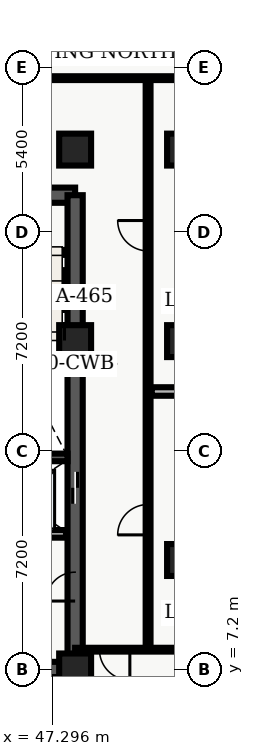
"""IFC4 building model, lengths in metres.
Left out: names, types, materials, properties, quantities, classifications, styles, units other than length and angle.
Written with IfcOpenShell. Run it as: python <this file> out.ifc"""

import sys

from ifc_helpers import new_model, entity, si_unit, converted_unit, direction, frame, origin_with_axes, origin_2d_with_axis, place, context, subcontext, project, spatial, polyline, rectangle, outline, extrude, element, fill, save


model = new_model("IFC4")
c1 = context("Model", 3, precision=1e-05, world=origin_with_axes(), true_north=direction((0.0, 1.0)))
c2 = subcontext(c1, "Body", "Model", "MODEL_VIEW")
j1 = project(units=[si_unit("LENGTHUNIT", "METRE"), converted_unit("PLANEANGLEUNIT", "DEGREE", entity("IfcPlaneAngleMeasure", 0.017), si_unit("PLANEANGLEUNIT", "RADIAN"), dimensions=[0, 0, 0, 0, 0, 0, 0])], contexts=[c1])
p1 = place(None, origin_with_axes())
s1 = spatial("IfcSite", under=j1, at=p1, CompositionType="ELEMENT")
p2 = place(p1, origin_with_axes())
s2 = spatial("IfcBuilding", under=s1, at=p2, CompositionType="ELEMENT")
p3 = place(p2, frame((0.0, 0.0, 164.1), z_axis=(0.0, 0.0, 1.0), x_axis=(1.0, 0.0, 0.0)))
s3 = spatial("IfcBuildingStorey", under=s2, at=p3, CompositionType="ELEMENT", Elevation=164.1)
p4 = place(p3, frame((40.2, 7.2, 0.0), z_axis=(0.0, 0.0, 1.0), x_axis=(1.0, 0.0, 0.0)))
e1 = element("IfcWall", 1, at=p4, inside=s3, PredefinedType="SHEAR", context=c2, shape_type="SweptSolid", body=[
    extrude(outline(polyline([(0.0, -0.25), (7.85, -0.25), (7.85, 0.25), (0.0, 0.25), (0.0, -0.25)])), origin_with_axes(), (0.0, 0.0, 1.0), 3.66),
])
p5 = place(p4, frame((2.175, 0.0, 0.0), z_axis=(0.0, 0.0, 1.0), x_axis=(1.0, 0.0, 0.0)))
e2 = element("IfcOpeningElement", 2, at=p5, cuts=e1, PredefinedType="OPENING", context=c2, shape_type="SweptSolid", body=[
    extrude(rectangle(XDim=1.05, YDim=0.52, at=origin_2d_with_axis()), origin_with_axes(), (0.0, 0.0, 1.0), 2.15),
])
p6 = place(p3, frame((40.2, 22.8, 0.0), z_axis=(0.0, 0.0, 1.0), x_axis=(1.0, 0.0, 0.0)))
e3 = element("IfcWall", 3, at=p6, inside=s3, PredefinedType="SHEAR", context=c2, shape_type="SweptSolid", body=[
    extrude(outline(polyline([(0.0, -0.25), (7.85, -0.25), (7.85, 0.25), (0.0, 0.25), (0.0, -0.25)])), origin_with_axes(), (0.0, 0.0, 1.0), 3.66),
])
p7 = place(p6, frame((5.775, 0.0, 0.0), z_axis=(0.0, 0.0, 1.0), x_axis=(1.0, 0.0, 0.0)))
e4 = element("IfcOpeningElement", 4, at=p7, cuts=e3, PredefinedType="OPENING", context=c2, shape_type="SweptSolid", body=[
    extrude(rectangle(XDim=1.05, YDim=0.52, at=origin_2d_with_axis()), origin_with_axes(), (0.0, 0.0, 1.0), 2.15),
])
p8 = place(p3, frame((48.05, 7.2, 0.0), z_axis=(0.0, 0.0, 1.0), x_axis=(0.0, 1.0, 0.0)))
e5 = element("IfcWall", 5, at=p8, inside=s3, PredefinedType="SHEAR", context=c2, shape_type="SweptSolid", body=[
    extrude(outline(polyline([(0.0, -0.25), (15.6, -0.25), (15.6, 0.25), (0.0, 0.25), (0.0, -0.25)])), origin_with_axes(), (0.0, 0.0, 1.0), 3.66),
])
p9 = place(p8, frame((5.975, 0.0, 0.0), z_axis=(0.0, 0.0, 1.0), x_axis=(1.0, 0.0, 0.0)))
e6 = element("IfcOpeningElement", 6, at=p9, cuts=e5, PredefinedType="OPENING", context=c2, shape_type="SweptSolid", body=[
    extrude(rectangle(XDim=1.05, YDim=0.52, at=origin_2d_with_axis()), origin_with_axes(), (0.0, 0.0, 1.0), 2.15),
])
p10 = place(p8, frame((2.725, 0.0, 0.0), z_axis=(0.0, 0.0, 1.0), x_axis=(1.0, 0.0, 0.0)))
e7 = element("IfcOpeningElement", 7, at=p10, cuts=e5, PredefinedType="OPENING", context=c2, shape_type="SweptSolid", body=[
    extrude(rectangle(XDim=0.95, YDim=0.52, at=origin_2d_with_axis()), origin_with_axes(), (0.0, 0.0, 1.0), 2.15),
])
p11 = place(p3, frame((44.25, 14.175, 0.0), z_axis=(0.0, 0.0, 1.0), x_axis=(1.0, 0.0, 0.0)))
e8 = element("IfcWall", 8, at=p11, inside=s3, PredefinedType="SHEAR", context=c2, shape_type="SweptSolid", body=[
    extrude(outline(polyline([(0.0, -0.125), (3.55, -0.125), (3.55, 0.125), (0.0, 0.125), (0.0, -0.125)])), origin_with_axes(), (0.0, 0.0, 1.0), 3.66),
])
for number, where, z_axis, x_axis in (
    (9, (48.05, 7.2, 0.0), (0.0, 0.0, 1.0), (1.0, 0.0, 0.0)),
    (10, (48.05, 18.0, 0.0), (0.0, 0.0, 1.0), (1.0, 0.0, 0.0)),
    (11, (48.05, 24.3, 0.0), (0.0, 0.0, 1.0), (1.0, 0.0, 0.0)),
    (12, (51.6, 10.8, 0.0), (0.0, 0.0, 1.0), (1.0, 0.0, 0.0)),
    (13, (51.6, 18.0, 0.0), (0.0, 0.0, 1.0), (1.0, 0.0, 0.0)),
    (14, (51.6, 24.3, 0.0), (0.0, 0.0, 1.0), (1.0, 0.0, 0.0)),
):
    element("IfcColumn", number, at=place(p3, frame(where, z_axis=z_axis, x_axis=x_axis)), inside=s3, PredefinedType="COLUMN", context=c2, shape_type="SweptSolid", body=[
        extrude(rectangle(XDim=1.05, YDim=1.05, at=origin_2d_with_axis()), origin_with_axes(), (0.0, 0.0, 1.0), 3.9),
    ])
p12 = place(p3, frame((44.25, 11.66, 0.0), z_axis=(0.0, 0.0, 1.0), x_axis=(1.0, 0.0, 0.0)))
e15 = element("IfcWall", 15, at=p12, inside=s3, PredefinedType="SOLIDWALL", context=c2, shape_type="SweptSolid", body=[
    extrude(outline(polyline([(0.0, -0.125), (3.5, -0.125), (3.5, 0.125), (0.0, 0.125), (0.0, -0.125)])), origin_with_axes(), (0.0, 0.0, 1.0), 2.7),
])
p13 = place(p3, frame((50.45, 7.85, 0.0), z_axis=(0.0, 0.0, 1.0), x_axis=(0.0, 1.0, 0.0)))
e16 = element("IfcWall", 16, at=p13, inside=s3, PredefinedType="PARTITIONING", context=c2, shape_type="SweptSolid", body=[
    extrude(outline(polyline([(0.0, -0.08), (18.8, -0.08), (18.8, 0.08), (0.0, 0.08), (0.0, -0.08)])), origin_with_axes(), (0.0, 0.0, 1.0), 2.7),
])
p14 = place(p13, frame((4.277, 0.0, 0.0), z_axis=(0.0, 0.0, 1.0), x_axis=(1.0, 0.0, 0.0)))
e17 = element("IfcOpeningElement", 17, at=p14, cuts=e16, PredefinedType="OPENING", context=c2, shape_type="SweptSolid", body=[
    extrude(rectangle(XDim=1.0, YDim=0.18, at=origin_2d_with_axis()), origin_with_axes(), (0.0, 0.0, 1.0), 2.15),
])
p15 = place(p13, frame((13.617, 0.0, 0.0), z_axis=(0.0, 0.0, 1.0), x_axis=(1.0, 0.0, 0.0)))
e18 = element("IfcOpeningElement", 18, at=p15, cuts=e16, PredefinedType="OPENING", context=c2, shape_type="SweptSolid", body=[
    extrude(rectangle(XDim=1.0, YDim=0.18, at=origin_2d_with_axis()), origin_with_axes(), (0.0, 0.0, 1.0), 2.15),
])
p16 = place(p3, frame((59.665, 7.85, 0.0), z_axis=(0.0, 0.0, 1.0), x_axis=(-1.0, 0.0, 0.0)))
e19 = element("IfcWall", 19, at=p16, inside=s3, PredefinedType="PARTITIONING", context=c2, shape_type="SweptSolid", body=[
    extrude(outline(polyline([(0.0, -0.062), (11.615, -0.062), (11.615, 0.062), (0.0, 0.062), (0.0, -0.062)])), origin_with_axes(), (0.0, 0.0, 1.0), 2.7),
])
p17 = place(p16, frame((10.315, 0.0, 0.0), z_axis=(0.0, 0.0, 1.0), x_axis=(1.0, 0.0, 0.0)))
e20 = element("IfcOpeningElement", 20, at=p17, cuts=e19, PredefinedType="OPENING", context=c2, shape_type="SweptSolid", body=[
    extrude(rectangle(XDim=1.0, YDim=0.145, at=origin_2d_with_axis()), origin_with_axes(), (0.0, 0.0, 1.0), 2.15),
])
p18 = place(p3, frame((38.735, 26.65, 0.0), z_axis=(0.0, 0.0, 1.0), x_axis=(1.0, 0.0, 0.0)))
e21 = element("IfcWall", 21, at=p18, inside=s3, PredefinedType="PARTITIONING", context=c2, shape_type="SweptSolid", body=[
    extrude(outline(polyline([(0.0, -0.062), (20.905, -0.062), (20.905, 0.062), (0.0, 0.062), (0.0, -0.062)])), origin_with_axes(), (0.0, 0.0, 1.0), 2.7),
])
p19 = place(p18, frame((4.265, 0.0, 0.0), z_axis=(0.0, 0.0, 1.0), x_axis=(1.0, 0.0, 0.0)))
e22 = element("IfcOpeningElement", 22, at=p19, cuts=e21, PredefinedType="OPENING", context=c2, shape_type="SweptSolid", body=[
    extrude(rectangle(XDim=1.0, YDim=0.145, at=origin_2d_with_axis()), origin_with_axes(), (0.0, 0.0, 1.0), 2.15),
])
p20 = place(p3, frame((50.57, 16.343, 0.0), z_axis=(0.0, 0.0, 1.0), x_axis=(1.0, 0.0, 0.0)))
e23 = element("IfcWall", 23, at=p20, inside=s3, PredefinedType="PARTITIONING", context=c2, shape_type="SweptSolid", body=[
    extrude(outline(polyline([(0.0, -0.14), (9.095, -0.14), (9.095, 0.14), (0.0, 0.14), (0.0, -0.14)])), origin_with_axes(), (0.0, 0.0, 1.0), 2.7),
])
p21 = place(p8, frame((5.975, 0.0, 0.0), z_axis=(0.0, 0.0, 1.0), x_axis=(1.0, 0.0, 0.0)))
e24 = element("IfcDoor", 24, at=p21, inside=s3, OperationType="SLIDING_TO_LEFT", PredefinedType="DOOR", context=c2, shape_type="SweptSolid", body=[
    extrude(rectangle(XDim=1.05, YDim=0.09, at=origin_2d_with_axis()), origin_with_axes(), (0.0, 0.0, 1.0), 2.15),
])
fill(e6, e24)
p22 = place(p8, frame((2.725, 0.0, 0.0), z_axis=(0.0, 0.0, 1.0), x_axis=(1.0, 0.0, 0.0)))
e25 = element("IfcDoor", 25, at=p22, inside=s3, OperationType="SINGLE_SWING_LEFT", PredefinedType="DOOR", context=c2, shape_type="SweptSolid", body=[
    extrude(rectangle(XDim=0.95, YDim=0.09, at=origin_2d_with_axis()), origin_with_axes(), (0.0, 0.0, 1.0), 2.15),
])
fill(e7, e25)
p23 = place(p16, frame((10.315, 0.0, 0.0), z_axis=(0.0, 0.0, 1.0), x_axis=(1.0, 0.0, 0.0)))
e26 = element("IfcDoor", 26, at=p23, inside=s3, OperationType="SINGLE_SWING_LEFT", PredefinedType="DOOR", context=c2, shape_type="SweptSolid", body=[
    extrude(rectangle(XDim=1.0, YDim=0.075, at=origin_2d_with_axis()), origin_with_axes(), (0.0, 0.0, 1.0), 2.15),
])
fill(e20, e26)
p24 = place(p13, frame((4.277, 0.0, 0.0), z_axis=(0.0, 0.0, 1.0), x_axis=(1.0, 0.0, 0.0)))
e27 = element("IfcDoor", 27, at=p24, inside=s3, OperationType="SINGLE_SWING_LEFT", PredefinedType="DOOR", context=c2, shape_type="SweptSolid", body=[
    extrude(rectangle(XDim=1.0, YDim=0.09, at=origin_2d_with_axis()), origin_with_axes(), (0.0, 0.0, 1.0), 2.15),
])
fill(e17, e27)
p25 = place(p13, frame((13.617, 0.0, 0.0), z_axis=(0.0, 0.0, 1.0), x_axis=(1.0, 0.0, 0.0)))
e28 = element("IfcDoor", 28, at=p25, inside=s3, OperationType="SINGLE_SWING_RIGHT", PredefinedType="DOOR", context=c2, shape_type="SweptSolid", body=[
    extrude(rectangle(XDim=1.0, YDim=0.09, at=origin_2d_with_axis()), origin_with_axes(), (0.0, 0.0, 1.0), 2.15),
])
fill(e18, e28)
save(model, sys.argv[1])
